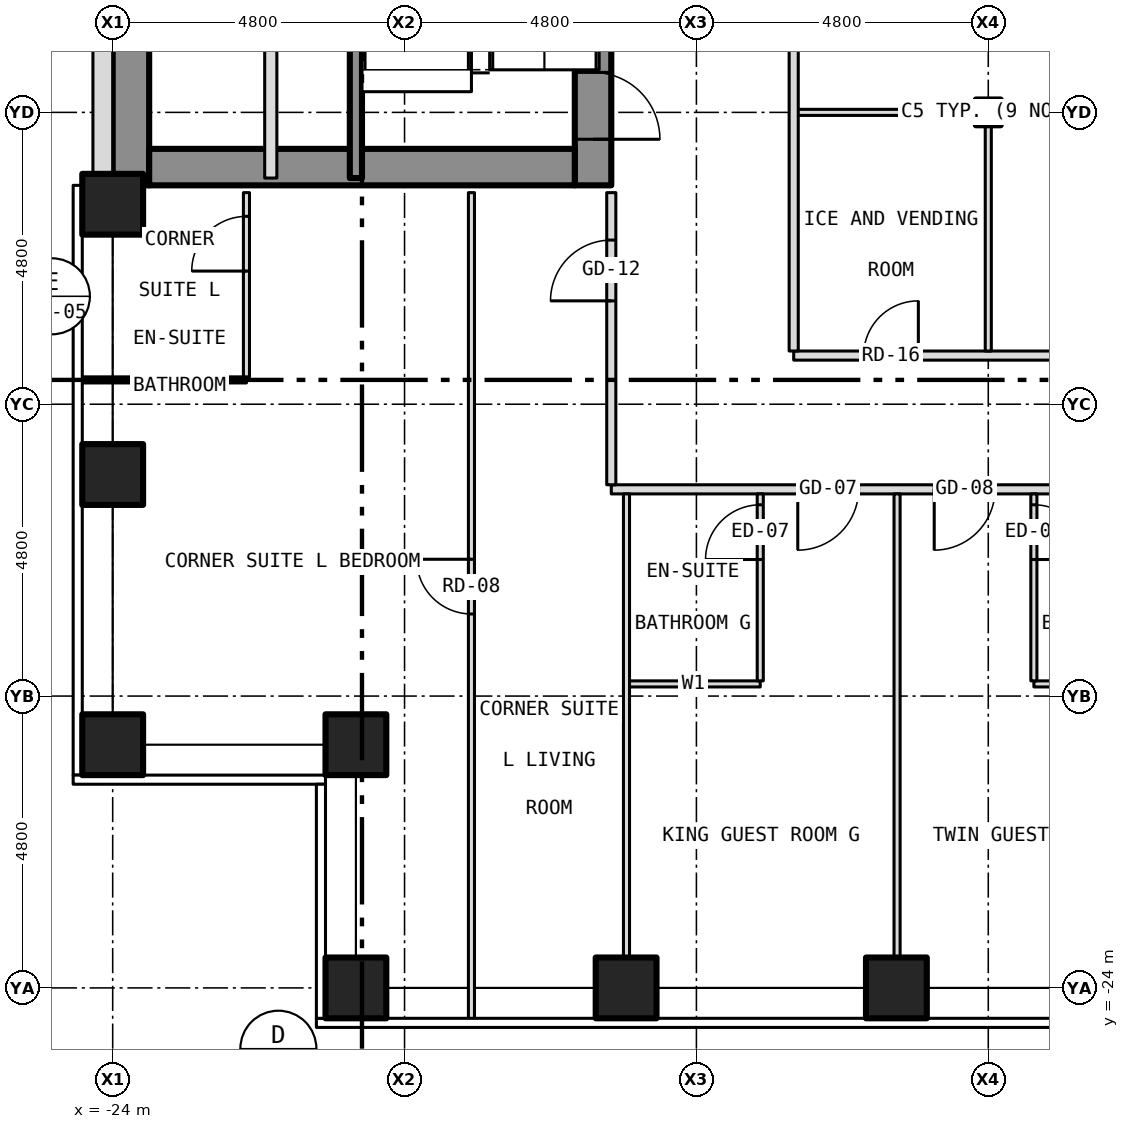
"""IFC4 building model, lengths in metres.
Left out: names, types, materials, properties, quantities, classifications, styles, units other than length and angle.
Written with IfcOpenShell. Run it as: python <this file> out.ifc"""

import sys

from ifc_helpers import new_model, si_unit, direction, frame, frame_2d, origin, origin_2d, place, context, subcontext, project, spatial, rectangle, hollow_rectangle, i_section, extrude, element, fill, save


model = new_model("IFC4")
c1 = context("Model", 3, precision=1e-05, world=origin(), true_north=direction((0.0, 1.0)))
c2 = subcontext(c1, "Body", "Model", "MODEL_VIEW")
j1 = project(units=[si_unit("LENGTHUNIT", "METRE"), si_unit("PLANEANGLEUNIT", "RADIAN")], contexts=[c1])
p1 = place(None, origin())
s1 = spatial("IfcSite", under=j1, at=p1, CompositionType="ELEMENT")
p2 = place(p1, origin())
s2 = spatial("IfcBuilding", under=s1, at=p2, CompositionType="ELEMENT")
p3 = place(p2, frame((0.0, 0.0, 56.5)))
s3 = spatial("IfcBuildingStorey", under=s2, at=p3, CompositionType="ELEMENT", Elevation=56.5)
for number, where, z_axis, x_axis in (
    (1, (-20.0, -24.0, -0.15), (0.0, 0.0, 1.0), (1.0, 0.0, 0.0)),
    (2, (-15.556, -24.0, -0.15), (0.0, 0.0, 1.0), (1.0, 0.0, 0.0)),
    (3, (-11.111, -24.0, -0.15), (0.0, 0.0, 1.0), (1.0, 0.0, 0.0)),
    (4, (-24.0, -20.0, -0.15), (0.0, 0.0, 1.0), (1.0, 0.0, 0.0)),
    (5, (-24.0, -15.556, -0.15), (0.0, 0.0, 1.0), (1.0, 0.0, 0.0)),
    (6, (-24.0, -11.111, -0.15), (0.0, 0.0, 1.0), (1.0, 0.0, 0.0)),
    (7, (-20.0, -20.0, -0.15), (0.0, 0.0, 1.0), (1.0, 0.0, 0.0)),
):
    element("IfcColumn", number, at=place(p3, frame(where, z_axis=z_axis, x_axis=x_axis)), inside=s3, PredefinedType="COLUMN", context=c2, shape_type="SweptSolid", body=[
        extrude(hollow_rectangle(XDim=1.0, YDim=1.0, WallThickness=0.06, at=origin_2d()), origin(), (0.0, 0.0, 1.0), 3.5),
    ])
p4 = place(p3, frame((-9.6, -9.6, -0.15), z_axis=(0.0, 0.0, 1.0), x_axis=(1.0, 0.0, 0.0)))
e8 = element("IfcColumn", 8, at=p4, inside=s3, PredefinedType="COLUMN", context=c2, shape_type="SweptSolid", body=[
    extrude(i_section(OverallWidth=0.409, OverallDepth=0.424, WebThickness=0.033, FlangeThickness=0.052, at=origin_2d()), origin(), (0.0, 0.0, 1.0), 3.5),
])
p5 = place(p3, frame((-16.1, -10.8, 0.0), z_axis=(0.0, 0.0, 1.0), x_axis=(0.0, 1.0, 0.0)))
e9 = element("IfcWall", 9, at=p5, inside=s3, PredefinedType="SHEAR", context=c2, shape_type="SweptSolid", body=[
    extrude(rectangle(XDim=21.6, YDim=0.6, at=frame_2d((10.8, 0.0))), origin(), (0.0, 0.0, 1.0), 3.25),
])
p6 = place(p5, frame((9.4, 0.0, 0.0)))
e10 = element("IfcOpeningElement", 10, at=p6, cuts=e9, PredefinedType="OPENING", context=c2, shape_type="SweptSolid", body=[
    extrude(rectangle(XDim=1.1, YDim=2.1, at=frame_2d((0.55, 1.05))), frame((0.0, 0.312, 0.0), z_axis=(0.0, -1.0, 0.0), x_axis=(1.0, 0.0, 0.0)), (0.0, 0.0, 1.0), 0.624),
])
p7 = place(p5, frame((11.5, 0.0, 0.0)))
e11 = element("IfcOpeningElement", 11, at=p7, cuts=e9, PredefinedType="OPENING", context=c2, shape_type="SweptSolid", body=[
    extrude(rectangle(XDim=1.1, YDim=2.1, at=frame_2d((0.55, 1.05))), frame((0.0, 0.312, 0.0), z_axis=(0.0, -1.0, 0.0), x_axis=(1.0, 0.0, 0.0)), (0.0, 0.0, 1.0), 0.624),
])
p8 = place(p5, frame((13.6, 0.0, 0.0)))
e12 = element("IfcOpeningElement", 12, at=p8, cuts=e9, PredefinedType="OPENING", context=c2, shape_type="SweptSolid", body=[
    extrude(rectangle(XDim=1.1, YDim=2.1, at=frame_2d((0.55, 1.05))), frame((0.0, 0.312, 0.0), z_axis=(0.0, -1.0, 0.0), x_axis=(1.0, 0.0, 0.0)), (0.0, 0.0, 1.0), 0.624),
])
p9 = place(p5, frame((15.7, 0.0, 0.0)))
e13 = element("IfcOpeningElement", 13, at=p9, cuts=e9, PredefinedType="OPENING", context=c2, shape_type="SweptSolid", body=[
    extrude(rectangle(XDim=1.1, YDim=2.1, at=frame_2d((0.55, 1.05))), frame((0.0, 0.312, 0.0), z_axis=(0.0, -1.0, 0.0), x_axis=(1.0, 0.0, 0.0)), (0.0, 0.0, 1.0), 0.624),
])
p10 = place(p5, frame((17.8, 0.0, 0.0)))
e14 = element("IfcOpeningElement", 14, at=p10, cuts=e9, PredefinedType="OPENING", context=c2, shape_type="SweptSolid", body=[
    extrude(rectangle(XDim=1.1, YDim=2.1, at=frame_2d((0.55, 1.05))), frame((0.0, 0.312, 0.0), z_axis=(0.0, -1.0, 0.0), x_axis=(1.0, 0.0, 0.0)), (0.0, 0.0, 1.0), 0.624),
])
p11 = place(p5, frame((0.758, 0.0, 0.0)))
e15 = element("IfcOpeningElement", 15, at=p11, cuts=e9, PredefinedType="OPENING", context=c2, shape_type="SweptSolid", body=[
    extrude(rectangle(XDim=1.1, YDim=2.1, at=frame_2d((0.55, 1.05))), frame((0.0, 0.312, 0.0), z_axis=(0.0, -1.0, 0.0), x_axis=(1.0, 0.0, 0.0)), (0.0, 0.0, 1.0), 0.624),
])
p12 = place(p5, frame((7.5, 0.0, 0.0)))
e16 = element("IfcOpeningElement", 16, at=p12, cuts=e9, PredefinedType="OPENING", context=c2, shape_type="SweptSolid", body=[
    extrude(rectangle(XDim=1.1, YDim=2.1, at=frame_2d((0.55, 1.05))), frame((0.0, 0.312, 0.0), z_axis=(0.0, -1.0, 0.0), x_axis=(1.0, 0.0, 0.0)), (0.0, 0.0, 1.0), 0.624),
])
p13 = place(p3, frame((-23.7, -10.8, 0.0), z_axis=(0.0, 0.0, 1.0), x_axis=(0.0, 1.0, 0.0)))
e17 = element("IfcWall", 17, at=p13, inside=s3, PredefinedType="SHEAR", context=c2, shape_type="SweptSolid", body=[
    extrude(rectangle(XDim=21.6, YDim=0.6, at=frame_2d((10.8, 0.0))), origin(), (0.0, 0.0, 1.0), 3.25),
])
p14 = place(p3, frame((-23.4, -10.5, 0.0), z_axis=(0.0, 0.0, 1.0), x_axis=(1.0, 0.0, 0.0)))
e18 = element("IfcWall", 18, at=p14, inside=s3, PredefinedType="SHEAR", context=c2, shape_type="SweptSolid", body=[
    extrude(rectangle(XDim=7.0, YDim=0.6, at=frame_2d((3.5, 0.0))), origin(), (0.0, 0.0, 1.0), 3.25),
])
p15 = place(p3, frame((-24.163, 10.8, 0.0), z_axis=(0.0, 0.0, 1.0), x_axis=(0.0, -1.0, 0.0)))
e19 = element("IfcWall", 19, at=p15, inside=s3, PredefinedType="SOLIDWALL", context=c2, shape_type="SweptSolid", body=[
    extrude(rectangle(XDim=21.6, YDim=0.325, at=frame_2d((10.8, 0.0))), origin(), (0.0, 0.0, 1.0), 3.5),
])
p16 = place(p15, frame((18.05, 0.0, 1.0)))
e20 = element("IfcOpeningElement", 20, at=p16, cuts=e19, PredefinedType="OPENING", context=c2, shape_type="SweptSolid", body=[
    extrude(rectangle(XDim=0.6, YDim=1.5, at=frame_2d((0.3, 0.75))), frame((0.0, 0.175, 0.0), z_axis=(0.0, -1.0, 0.0), x_axis=(1.0, 0.0, 0.0)), (0.0, 0.0, 1.0), 0.349),
])
p17 = place(p3, frame((-15.55, -19.0, 0.0), z_axis=(0.0, 0.0, 1.0), x_axis=(1.0, 0.0, 0.0)))
e21 = element("IfcWall", 21, at=p17, inside=s3, PredefinedType="PARTITIONING", context=c2, shape_type="SweptSolid", body=[
    extrude(rectangle(XDim=2.2, YDim=0.1, at=frame_2d((1.1, 0.0))), origin(), (0.0, 0.0, 1.0), 3.35),
])
p18 = place(p3, frame((-8.85, -19.0, 0.0), z_axis=(0.0, 0.0, 1.0), x_axis=(1.0, 0.0, 0.0)))
e22 = element("IfcWall", 22, at=p18, inside=s3, PredefinedType="PARTITIONING", context=c2, shape_type="SweptSolid", body=[
    extrude(rectangle(XDim=2.2, YDim=0.1, at=frame_2d((1.1, 0.0))), origin(), (0.0, 0.0, 1.0), 3.35),
])
p19 = place(p3, frame((-15.8, -15.8, 0.0), z_axis=(0.0, 0.0, 1.0), x_axis=(1.0, 0.0, 0.0)))
e23 = element("IfcWall", 23, at=p19, inside=s3, PredefinedType="PARTITIONING", context=c2, shape_type="SweptSolid", body=[
    extrude(rectangle(XDim=31.6, YDim=0.15, at=frame_2d((15.8, 0.0))), origin(), (0.0, 0.0, 1.0), 3.35),
])
p20 = place(p19, frame((3.067, 0.0, 0.0)))
e24 = element("IfcOpeningElement", 24, at=p20, cuts=e23, PredefinedType="OPENING", context=c2, shape_type="SweptSolid", body=[
    extrude(rectangle(XDim=1.0, YDim=2.1, at=frame_2d((0.5, 1.05))), frame((0.0, 0.087, 0.0), z_axis=(0.0, -1.0, 0.0), x_axis=(1.0, 0.0, 0.0)), (0.0, 0.0, 1.0), 0.174),
])
p21 = place(p19, frame((5.311, 0.0, 0.0)))
e25 = element("IfcOpeningElement", 25, at=p21, cuts=e23, PredefinedType="OPENING", context=c2, shape_type="SweptSolid", body=[
    extrude(rectangle(XDim=1.0, YDim=2.1, at=frame_2d((0.5, 1.05))), frame((0.0, 0.087, 0.0), z_axis=(0.0, -1.0, 0.0), x_axis=(1.0, 0.0, 0.0)), (0.0, 0.0, 1.0), 0.174),
])
p22 = place(p19, frame((9.756, 0.0, 0.0)))
e26 = element("IfcOpeningElement", 26, at=p22, cuts=e23, PredefinedType="OPENING", context=c2, shape_type="SweptSolid", body=[
    extrude(rectangle(XDim=1.0, YDim=2.1, at=frame_2d((0.5, 1.05))), frame((0.0, 0.087, 0.0), z_axis=(0.0, -1.0, 0.0), x_axis=(1.0, 0.0, 0.0)), (0.0, 0.0, 1.0), 0.174),
])
p23 = place(p19, frame((15.311, 0.0, 0.0)))
e27 = element("IfcOpeningElement", 27, at=p23, cuts=e23, PredefinedType="OPENING", context=c2, shape_type="SweptSolid", body=[
    extrude(rectangle(XDim=1.0, YDim=2.1, at=frame_2d((0.5, 1.05))), frame((0.0, 0.087, 0.0), z_axis=(0.0, -1.0, 0.0), x_axis=(1.0, 0.0, 0.0)), (0.0, 0.0, 1.0), 0.174),
])
p24 = place(p19, frame((22.245, 0.0, 0.0)))
e28 = element("IfcOpeningElement", 28, at=p24, cuts=e23, PredefinedType="OPENING", context=c2, shape_type="SweptSolid", body=[
    extrude(rectangle(XDim=1.0, YDim=2.1, at=frame_2d((0.5, 1.05))), frame((0.0, 0.087, 0.0), z_axis=(0.0, -1.0, 0.0), x_axis=(1.0, 0.0, 0.0)), (0.0, 0.0, 1.0), 0.174),
])
p25 = place(p3, frame((-24.53, -14.0, 0.0), z_axis=(0.0, 0.0, 1.0), x_axis=(1.0, 0.0, 0.0)))
e29 = element("IfcWall", 29, at=p25, inside=s3, PredefinedType="PARTITIONING", context=c2, shape_type="SweptSolid", body=[
    extrude(rectangle(XDim=2.73, YDim=0.1, at=frame_2d((1.365, 0.0))), origin(), (0.0, 0.0, 1.0), 3.35),
])
p26 = place(p3, frame((-12.8, -13.6, 0.0), z_axis=(0.0, 0.0, 1.0), x_axis=(1.0, 0.0, 0.0)))
e30 = element("IfcWall", 30, at=p26, inside=s3, PredefinedType="PARTITIONING", context=c2, shape_type="SweptSolid", body=[
    extrude(rectangle(XDim=16.9, YDim=0.15, at=frame_2d((8.45, 0.0))), origin(), (0.0, 0.0, 1.0), 3.35),
])
p27 = place(p26, frame((1.15, 0.0, 0.0)))
e31 = element("IfcOpeningElement", 31, at=p27, cuts=e30, PredefinedType="OPENING", context=c2, shape_type="SweptSolid", body=[
    extrude(rectangle(XDim=0.9, YDim=2.1, at=frame_2d((0.45, 1.05))), frame((0.0, 0.087, 0.0), z_axis=(0.0, -1.0, 0.0), x_axis=(1.0, 0.0, 0.0)), (0.0, 0.0, 1.0), 0.174),
])
p28 = place(p26, frame((13.375, 0.0, 0.0)))
e32 = element("IfcOpeningElement", 32, at=p28, cuts=e30, PredefinedType="OPENING", context=c2, shape_type="SweptSolid", body=[
    extrude(rectangle(XDim=0.9, YDim=2.1, at=frame_2d((0.45, 1.05))), frame((0.0, 0.087, 0.0), z_axis=(0.0, -1.0, 0.0), x_axis=(1.0, 0.0, 0.0)), (0.0, 0.0, 1.0), 0.174),
])
p29 = place(p26, frame((7.55, 0.0, 0.0)))
e33 = element("IfcOpeningElement", 33, at=p29, cuts=e30, PredefinedType="OPENING", context=c2, shape_type="SweptSolid", body=[
    extrude(rectangle(XDim=0.9, YDim=2.1, at=frame_2d((0.45, 1.05))), frame((0.0, 0.087, 0.0), z_axis=(0.0, -1.0, 0.0), x_axis=(1.0, 0.0, 0.0)), (0.0, 0.0, 1.0), 0.174),
])
p30 = place(p3, frame((-12.8, -9.6, 0.0), z_axis=(0.0, 0.0, 1.0), x_axis=(1.0, 0.0, 0.0)))
e34 = element("IfcWall", 34, at=p30, inside=s3, PredefinedType="PARTITIONING", context=c2, shape_type="SweptSolid", body=[
    extrude(rectangle(XDim=2.996, YDim=0.1, at=frame_2d((1.498, 0.0))), origin(), (0.0, 0.0, 1.0), 2.728),
])
p31 = place(p3, frame((-9.804, -9.6, 0.0), z_axis=(0.0, 0.0, 1.0), x_axis=(1.0, 0.0, 0.0)))
e35 = element("IfcWall", 35, at=p31, inside=s3, PredefinedType="PARTITIONING", context=c2, shape_type="SweptSolid", body=[
    extrude(rectangle(XDim=0.408, YDim=0.1, at=frame_2d((0.204, 0.0))), origin(), (0.0, 0.0, 1.0), 3.35),
])
p32 = place(p3, frame((-9.396, -9.6, 0.0), z_axis=(0.0, 0.0, 1.0), x_axis=(1.0, 0.0, 0.0)))
e36 = element("IfcWall", 36, at=p32, inside=s3, PredefinedType="PARTITIONING", context=c2, shape_type="SweptSolid", body=[
    extrude(rectangle(XDim=9.192, YDim=0.1, at=frame_2d((4.596, 0.0))), origin(), (0.0, 0.0, 1.0), 2.728),
])
p33 = place(p3, frame((-21.8, -13.95, 0.0), z_axis=(0.0, 0.0, 1.0), x_axis=(0.0, 1.0, 0.0)))
e37 = element("IfcWall", 37, at=p33, inside=s3, PredefinedType="PARTITIONING", context=c2, shape_type="SweptSolid", body=[
    extrude(rectangle(XDim=3.03, YDim=0.1, at=frame_2d((1.515, 0.0))), origin(), (0.0, 0.0, 1.0), 3.35),
])
p34 = place(p33, frame((1.74, 0.0, 0.0)))
e38 = element("IfcOpeningElement", 38, at=p34, cuts=e37, PredefinedType="OPENING", context=c2, shape_type="SweptSolid", body=[
    extrude(rectangle(XDim=0.9, YDim=2.1, at=frame_2d((0.45, 1.05))), frame((0.0, 0.062, 0.0), z_axis=(0.0, -1.0, 0.0), x_axis=(1.0, 0.0, 0.0)), (0.0, 0.0, 1.0), 0.124),
])
p35 = place(p3, frame((-21.4, -10.68, 0.0), z_axis=(0.0, 0.0, 1.0), x_axis=(0.0, 1.0, 0.0)))
e39 = element("IfcWall", 39, at=p35, inside=s3, PredefinedType="PARTITIONING", context=c2, shape_type="SweptSolid", body=[
    extrude(rectangle(XDim=8.68, YDim=0.2, at=frame_2d((4.34, 0.0))), origin(), (0.0, 0.0, 1.0), 3.25),
])
p36 = place(p35, frame((3.88, 0.0, 0.0)))
e40 = element("IfcOpeningElement", 40, at=p36, cuts=e39, PredefinedType="OPENING", context=c2, shape_type="SweptSolid", body=[
    extrude(rectangle(XDim=0.9, YDim=2.1, at=frame_2d((0.45, 1.05))), frame((0.0, 0.112, 0.0), z_axis=(0.0, -1.0, 0.0), x_axis=(1.0, 0.0, 0.0)), (0.0, 0.0, 1.0), 0.224),
])
p37 = place(p3, frame((-20.0, -10.68, 0.0), z_axis=(0.0, 0.0, 1.0), x_axis=(0.0, 1.0, 0.0)))
e41 = element("IfcWall", 41, at=p37, inside=s3, PredefinedType="SHEAR", context=c2, shape_type="SweptSolid", body=[
    extrude(rectangle(XDim=6.98, YDim=0.2, at=frame_2d((3.49, 0.0))), origin(), (0.0, 0.0, 1.0), 3.25),
])
p38 = place(p3, frame((-18.1, -24.53, 0.0), z_axis=(0.0, 0.0, 1.0), x_axis=(0.0, 1.0, 0.0)))
e42 = element("IfcWall", 42, at=p38, inside=s3, PredefinedType="PARTITIONING", context=c2, shape_type="SweptSolid", body=[
    extrude(rectangle(XDim=13.61, YDim=0.1, at=frame_2d((6.805, 0.0))), origin(), (0.0, 0.0, 1.0), 3.35),
])
p39 = place(p38, frame((6.68, 0.0, 0.0)))
e43 = element("IfcOpeningElement", 43, at=p39, cuts=e42, PredefinedType="OPENING", context=c2, shape_type="SweptSolid", body=[
    extrude(rectangle(XDim=0.9, YDim=2.1, at=frame_2d((0.45, 1.05))), frame((0.0, 0.062, 0.0), z_axis=(0.0, -1.0, 0.0), x_axis=(1.0, 0.0, 0.0)), (0.0, 0.0, 1.0), 0.124),
])
p40 = place(p3, frame((-15.8, -15.725, 0.0), z_axis=(0.0, 0.0, 1.0), x_axis=(0.0, 1.0, 0.0)))
e44 = element("IfcWall", 44, at=p40, inside=s3, PredefinedType="PARTITIONING", context=c2, shape_type="SweptSolid", body=[
    extrude(rectangle(XDim=4.805, YDim=0.15, at=frame_2d((2.403, 0.0))), origin(), (0.0, 0.0, 1.0), 3.35),
])
p41 = place(p40, frame((3.025, 0.0, 0.0)))
e45 = element("IfcOpeningElement", 45, at=p41, cuts=e44, PredefinedType="OPENING", context=c2, shape_type="SweptSolid", body=[
    extrude(rectangle(XDim=1.0, YDim=2.1, at=frame_2d((0.5, 1.05))), frame((0.0, 0.087, 0.0), z_axis=(0.0, -1.0, 0.0), x_axis=(1.0, 0.0, 0.0)), (0.0, 0.0, 1.0), 0.174),
])
p42 = place(p3, frame((-15.55, -23.88, 0.0), z_axis=(0.0, 0.0, 1.0), x_axis=(0.0, 1.0, 0.0)))
e46 = element("IfcWall", 46, at=p42, inside=s3, PredefinedType="PARTITIONING", context=c2, shape_type="SweptSolid", body=[
    extrude(rectangle(XDim=8.005, YDim=0.1, at=frame_2d((4.002, 0.0))), origin(), (0.0, 0.0, 1.0), 3.35),
])
p43 = place(p3, frame((-13.35, -18.95, 0.0), z_axis=(0.0, 0.0, 1.0), x_axis=(0.0, 1.0, 0.0)))
e47 = element("IfcWall", 47, at=p43, inside=s3, PredefinedType="PARTITIONING", context=c2, shape_type="SweptSolid", body=[
    extrude(rectangle(XDim=3.075, YDim=0.1, at=frame_2d((1.538, 0.0))), origin(), (0.0, 0.0, 1.0), 3.35),
])
p44 = place(p43, frame((1.996, 0.0, 0.0)))
e48 = element("IfcOpeningElement", 48, at=p44, cuts=e47, PredefinedType="OPENING", context=c2, shape_type="SweptSolid", body=[
    extrude(rectangle(XDim=0.9, YDim=2.1, at=frame_2d((0.45, 1.05))), frame((0.0, 0.062, 0.0), z_axis=(0.0, -1.0, 0.0), x_axis=(1.0, 0.0, 0.0)), (0.0, 0.0, 1.0), 0.124),
])
p45 = place(p3, frame((-12.8, -13.525, 0.0), z_axis=(0.0, 0.0, 1.0), x_axis=(0.0, 1.0, 0.0)))
e49 = element("IfcWall", 49, at=p45, inside=s3, PredefinedType="PARTITIONING", context=c2, shape_type="SweptSolid", body=[
    extrude(rectangle(XDim=11.525, YDim=0.15, at=frame_2d((5.762, 0.0))), origin(), (0.0, 0.0, 1.0), 3.35),
])
p46 = place(p45, frame((7.325, 0.0, 0.0)))
e50 = element("IfcOpeningElement", 50, at=p46, cuts=e49, PredefinedType="OPENING", context=c2, shape_type="SweptSolid", body=[
    extrude(rectangle(XDim=0.9, YDim=2.1, at=frame_2d((0.45, 1.05))), frame((0.0, 0.087, 0.0), z_axis=(0.0, -1.0, 0.0), x_axis=(1.0, 0.0, 0.0)), (0.0, 0.0, 1.0), 0.174),
])
p47 = place(p3, frame((-11.1, -23.88, 0.0), z_axis=(0.0, 0.0, 1.0), x_axis=(0.0, 1.0, 0.0)))
e51 = element("IfcWall", 51, at=p47, inside=s3, PredefinedType="PARTITIONING", context=c2, shape_type="SweptSolid", body=[
    extrude(rectangle(XDim=8.005, YDim=0.1, at=frame_2d((4.002, 0.0))), origin(), (0.0, 0.0, 1.0), 3.35),
])
p48 = place(p3, frame((-9.6, -13.525, 0.0), z_axis=(0.0, 0.0, 1.0), x_axis=(0.0, 1.0, 0.0)))
e52 = element("IfcWall", 52, at=p48, inside=s3, PredefinedType="PARTITIONING", context=c2, shape_type="SweptSolid", body=[
    extrude(rectangle(XDim=3.875, YDim=0.1, at=frame_2d((1.938, 0.0))), origin(), (0.0, 0.0, 1.0), 2.728),
])
p49 = place(p3, frame((-8.85, -18.95, 0.0), z_axis=(0.0, 0.0, 1.0), x_axis=(0.0, 1.0, 0.0)))
e53 = element("IfcWall", 53, at=p49, inside=s3, PredefinedType="PARTITIONING", context=c2, shape_type="SweptSolid", body=[
    extrude(rectangle(XDim=3.075, YDim=0.1, at=frame_2d((1.538, 0.0))), origin(), (0.0, 0.0, 1.0), 3.35),
])
p50 = place(p49, frame((1.996, 0.0, 0.0)))
e54 = element("IfcOpeningElement", 54, at=p50, cuts=e53, PredefinedType="OPENING", context=c2, shape_type="SweptSolid", body=[
    extrude(rectangle(XDim=0.9, YDim=2.1, at=frame_2d((0.45, 1.05))), frame((0.0, 0.062, 0.0), z_axis=(0.0, -1.0, 0.0), x_axis=(1.0, 0.0, 0.0)), (0.0, 0.0, 1.0), 0.124),
])
p51 = place(p11, origin())
e55 = element("IfcDoor", 55, at=p51, inside=s3, OperationType="SINGLE_SWING_LEFT", PredefinedType="DOOR", context=c2, shape_type="SweptSolid", body=[
    extrude(rectangle(XDim=1.1, YDim=2.1, at=frame_2d((0.55, 1.05))), frame((0.0, 0.025, 0.0), z_axis=(0.0, -1.0, 0.0), x_axis=(1.0, 0.0, 0.0)), (0.0, 0.0, 1.0), 0.05),
])
fill(e15, e55)
p52 = place(p20, origin())
e56 = element("IfcDoor", 56, at=p52, inside=s3, OperationType="SINGLE_SWING_LEFT", PredefinedType="DOOR", context=c2, shape_type="SweptSolid", body=[
    extrude(rectangle(XDim=1.0, YDim=2.1, at=frame_2d((0.5, 1.05))), frame((0.0, 0.025, 0.0), z_axis=(0.0, -1.0, 0.0), x_axis=(1.0, 0.0, 0.0)), (0.0, 0.0, 1.0), 0.05),
])
fill(e24, e56)
p53 = place(p44, origin())
e57 = element("IfcDoor", 57, at=p53, inside=s3, OperationType="SINGLE_SWING_LEFT", PredefinedType="DOOR", context=c2, shape_type="SweptSolid", body=[
    extrude(rectangle(XDim=0.9, YDim=2.1, at=frame_2d((0.45, 1.05))), frame((0.0, 0.025, 0.0), z_axis=(0.0, -1.0, 0.0), x_axis=(1.0, 0.0, 0.0)), (0.0, 0.0, 1.0), 0.05),
])
fill(e48, e57)
p54 = place(p21, origin())
e58 = element("IfcDoor", 58, at=p54, inside=s3, OperationType="SINGLE_SWING_LEFT", PredefinedType="DOOR", context=c2, shape_type="SweptSolid", body=[
    extrude(rectangle(XDim=1.0, YDim=2.1, at=frame_2d((0.5, 1.05))), frame((0.0, 0.025, 0.0), z_axis=(0.0, -1.0, 0.0), x_axis=(1.0, 0.0, 0.0)), (0.0, 0.0, 1.0), 0.05),
])
fill(e25, e58)
p55 = place(p50, origin())
e59 = element("IfcDoor", 59, at=p55, inside=s3, OperationType="SINGLE_SWING_LEFT", PredefinedType="DOOR", context=c2, shape_type="SweptSolid", body=[
    extrude(rectangle(XDim=0.9, YDim=2.1, at=frame_2d((0.45, 1.05))), frame((0.0, 0.025, 0.0), z_axis=(0.0, -1.0, 0.0), x_axis=(1.0, 0.0, 0.0)), (0.0, 0.0, 1.0), 0.05),
])
fill(e54, e59)
p56 = place(p41, origin())
e60 = element("IfcDoor", 60, at=p56, inside=s3, OperationType="SINGLE_SWING_LEFT", PredefinedType="DOOR", context=c2, shape_type="SweptSolid", body=[
    extrude(rectangle(XDim=1.0, YDim=2.1, at=frame_2d((0.5, 1.05))), frame((0.0, 0.025, 0.0), z_axis=(0.0, -1.0, 0.0), x_axis=(1.0, 0.0, 0.0)), (0.0, 0.0, 1.0), 0.05),
])
fill(e45, e60)
p57 = place(p39, origin())
e61 = element("IfcDoor", 61, at=p57, inside=s3, OperationType="SINGLE_SWING_RIGHT", PredefinedType="DOOR", context=c2, shape_type="SweptSolid", body=[
    extrude(rectangle(XDim=0.9, YDim=2.1, at=frame_2d((0.45, 1.05))), frame((0.0, 0.025, 0.0), z_axis=(0.0, -1.0, 0.0), x_axis=(1.0, 0.0, 0.0)), (0.0, 0.0, 1.0), 0.05),
])
fill(e43, e61)
p58 = place(p34, origin())
e62 = element("IfcDoor", 62, at=p58, inside=s3, OperationType="SINGLE_SWING_LEFT", PredefinedType="DOOR", context=c2, shape_type="SweptSolid", body=[
    extrude(rectangle(XDim=0.9, YDim=2.1, at=frame_2d((0.45, 1.05))), frame((0.0, 0.025, 0.0), z_axis=(0.0, -1.0, 0.0), x_axis=(1.0, 0.0, 0.0)), (0.0, 0.0, 1.0), 0.05),
])
fill(e38, e62)
p59 = place(p27, origin())
e63 = element("IfcDoor", 63, at=p59, inside=s3, OperationType="SINGLE_SWING_RIGHT", PredefinedType="DOOR", context=c2, shape_type="SweptSolid", body=[
    extrude(rectangle(XDim=0.9, YDim=2.1, at=frame_2d((0.45, 1.05))), frame((0.0, 0.025, 0.0), z_axis=(0.0, -1.0, 0.0), x_axis=(1.0, 0.0, 0.0)), (0.0, 0.0, 1.0), 0.05),
])
fill(e31, e63)
save(model, sys.argv[1])
